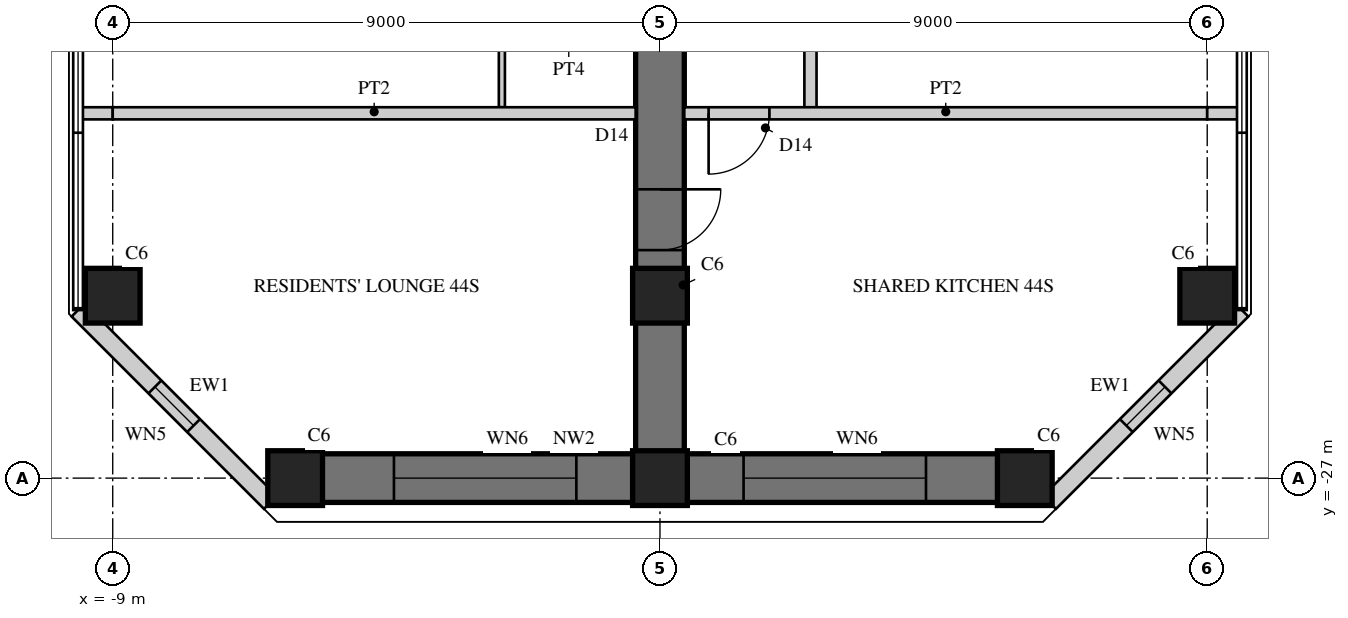
"""IFC4 building model, lengths in metres.
Left out: names, types, materials, properties, quantities, classifications, styles, units other than length and angle.
Written with IfcOpenShell. Run it as: python <this file> out.ifc"""

import sys

from ifc_helpers import new_model, si_unit, direction, frame, frame_2d, origin, origin_2d, place, context, subcontext, project, spatial, rectangle, hollow_rectangle, extrude, element, fill, save


model = new_model("IFC4")
c1 = context("Model", 3, precision=1e-05, world=origin(), true_north=direction((0.0, 1.0)))
c2 = subcontext(c1, "Body", "Model", "MODEL_VIEW")
j1 = project(units=[si_unit("LENGTHUNIT", "METRE"), si_unit("PLANEANGLEUNIT", "RADIAN")], contexts=[c1])
p1 = place(None, origin())
s1 = spatial("IfcSite", under=j1, at=p1, CompositionType="ELEMENT")
p2 = place(p1, origin())
s2 = spatial("IfcBuilding", under=s1, at=p2, CompositionType="ELEMENT")
p3 = place(p2, frame((0.0, 0.0, 179.7)))
s3 = spatial("IfcBuildingStorey", under=s2, at=p3, CompositionType="ELEMENT", Elevation=179.7)
p4 = place(p3, frame((0.0, -9.0, 0.0), z_axis=(0.0, 0.0, 1.0), x_axis=(0.0, -1.0, 0.0)))
e1 = element("IfcWall", 1, at=p4, inside=s3, PredefinedType="SHEAR", context=c2, shape_type="SweptSolid", body=[
    extrude(rectangle(XDim=18.0, YDim=0.8, at=frame_2d((9.0, 0.0))), origin(), (0.0, 0.0, 1.0), 3.4),
])
p5 = place(p4, frame((3.95, 0.0, 0.0)))
e2 = element("IfcOpeningElement", 2, at=p5, cuts=e1, PredefinedType="OPENING", context=c2, shape_type="SweptSolid", body=[
    extrude(rectangle(XDim=1.0, YDim=2.15, at=frame_2d((0.5, 1.075))), frame((0.0, 0.41, 0.0), z_axis=(0.0, -1.0, 0.0), x_axis=(1.0, 0.0, 0.0)), (0.0, 0.0, 1.0), 0.82),
])
p6 = place(p4, frame((6.6, 0.0, 0.0)))
e3 = element("IfcOpeningElement", 3, at=p6, cuts=e1, PredefinedType="OPENING", context=c2, shape_type="SweptSolid", body=[
    extrude(rectangle(XDim=1.0, YDim=2.15, at=frame_2d((0.5, 1.075))), frame((0.0, 0.41, 0.0), z_axis=(0.0, -1.0, 0.0), x_axis=(1.0, 0.0, 0.0)), (0.0, 0.0, 1.0), 0.82),
])
p7 = place(p4, frame((13.25, 0.0, 0.0)))
e4 = element("IfcOpeningElement", 4, at=p7, cuts=e1, PredefinedType="OPENING", context=c2, shape_type="SweptSolid", body=[
    extrude(rectangle(XDim=1.0, YDim=2.2, at=frame_2d((0.5, 1.1))), frame((0.0, 0.41, 0.0), z_axis=(0.0, -1.0, 0.0), x_axis=(1.0, 0.0, 0.0)), (0.0, 0.0, 1.0), 0.82),
])
p8 = place(p3, frame((-6.0, -27.0, 0.0), z_axis=(0.0, 0.0, 1.0), x_axis=(1.0, 0.0, 0.0)))
e5 = element("IfcWall", 5, at=p8, inside=s3, PredefinedType="SHEAR", context=c2, shape_type="SweptSolid", body=[
    extrude(rectangle(XDim=12.0, YDim=0.8, at=frame_2d((6.0, 0.0))), origin(), (0.0, 0.0, 1.0), 3.4),
])
p9 = place(p8, frame((1.625, 0.0, 0.6)))
e6 = element("IfcOpeningElement", 6, at=p9, cuts=e5, PredefinedType="OPENING", context=c2, shape_type="SweptSolid", body=[
    extrude(rectangle(XDim=3.0, YDim=2.4, at=frame_2d((1.5, 1.2))), frame((0.0, 0.41, 0.0), z_axis=(0.0, -1.0, 0.0), x_axis=(1.0, 0.0, 0.0)), (0.0, 0.0, 1.0), 0.82),
])
p10 = place(p8, frame((7.375, 0.0, 0.6)))
e7 = element("IfcOpeningElement", 7, at=p10, cuts=e5, PredefinedType="OPENING", context=c2, shape_type="SweptSolid", body=[
    extrude(rectangle(XDim=3.0, YDim=2.4, at=frame_2d((1.5, 1.2))), frame((0.0, 0.41, 0.0), z_axis=(0.0, -1.0, 0.0), x_axis=(1.0, 0.0, 0.0)), (0.0, 0.0, 1.0), 0.82),
])
for number, where, z_axis, x_axis in (
    (8, (-9.0, -24.0, 0.0), (0.0, 0.0, 1.0), (1.0, 0.0, 0.0)),
    (9, (9.0, -24.0, 0.0), (0.0, 0.0, 1.0), (1.0, 0.0, 0.0)),
    (10, (-6.0, -27.0, 0.0), (0.0, 0.0, 1.0), (1.0, 0.0, 0.0)),
    (11, (0.0, -27.0, 0.0), (0.0, 0.0, 1.0), (1.0, 0.0, 0.0)),
    (12, (6.0, -27.0, 0.0), (0.0, 0.0, 1.0), (1.0, 0.0, 0.0)),
    (13, (0.0, -24.0, 0.0), (0.0, 0.0, 1.0), (1.0, 0.0, 0.0)),
):
    element("IfcColumn", number, at=place(p3, frame(where, z_axis=z_axis, x_axis=x_axis)), inside=s3, PredefinedType="COLUMN", context=c2, shape_type="SweptSolid", body=[
        extrude(rectangle(XDim=0.9, YDim=0.9, at=origin_2d()), origin(), (0.0, 0.0, 1.0), 3.4),
    ])
p11 = place(p3, frame((-9.57, -24.236, 0.0), z_axis=(0.0, 0.0, 1.0), x_axis=(0.707134062067, -0.707079499254, 0.0)))
e14 = element("IfcWall", 14, at=p11, inside=s3, PredefinedType="SOLIDWALL", context=c2, shape_type="SweptSolid", body=[
    extrude(rectangle(XDim=4.475, YDim=0.3, at=frame_2d((2.237, 0.0))), origin(), (0.0, 0.0, 1.0), 3.22),
])
p12 = place(p11, frame((1.787, 0.0, 0.3)))
e15 = element("IfcOpeningElement", 15, at=p12, cuts=e14, PredefinedType="OPENING", context=c2, shape_type="SweptSolid", body=[
    extrude(rectangle(XDim=0.9, YDim=2.4, at=frame_2d((0.45, 1.2))), frame((0.0, 0.16, 0.0), z_axis=(0.0, -1.0, 0.0), x_axis=(1.0, 0.0, 0.0)), (0.0, 0.0, 1.0), 0.32),
])
p13 = place(p3, frame((6.406, -27.4, 0.0), z_axis=(0.0, 0.0, 1.0), x_axis=(0.707134062067, 0.707079499254, 0.0)))
e16 = element("IfcWall", 16, at=p13, inside=s3, PredefinedType="SOLIDWALL", context=c2, shape_type="SweptSolid", body=[
    extrude(rectangle(XDim=4.475, YDim=0.3, at=frame_2d((2.237, 0.0))), origin(), (0.0, 0.0, 1.0), 3.22),
])
p14 = place(p13, frame((1.787, 0.0, 0.3)))
e17 = element("IfcOpeningElement", 17, at=p14, cuts=e16, PredefinedType="OPENING", context=c2, shape_type="SweptSolid", body=[
    extrude(rectangle(XDim=0.9, YDim=2.4, at=frame_2d((0.45, 1.2))), frame((0.0, 0.16, 0.0), z_axis=(0.0, -1.0, 0.0), x_axis=(1.0, 0.0, 0.0)), (0.0, 0.0, 1.0), 0.32),
])
p15 = place(p3, frame((-2.6, -18.45, 0.0), z_axis=(0.0, 0.0, 1.0), x_axis=(0.0, -1.0, 0.0)))
e18 = element("IfcWall", 18, at=p15, inside=s3, PredefinedType="PARTITIONING", context=c2, shape_type="SweptSolid", body=[
    extrude(rectangle(XDim=2.45, YDim=0.1, at=frame_2d((1.225, 0.0))), origin(), (0.0, 0.0, 1.0), 3.22),
])
p16 = place(p3, frame((2.475, -9.55, 0.0), z_axis=(0.0, 0.0, 1.0), x_axis=(0.0, -1.0, 0.0)))
e19 = element("IfcWall", 19, at=p16, inside=s3, PredefinedType="SOLIDWALL", context=c2, shape_type="SweptSolid", body=[
    extrude(rectangle(XDim=11.45, YDim=0.2, at=frame_2d((5.725, 0.0))), origin(), (0.0, 0.0, 1.0), 3.22),
])
p17 = place(p16, frame((3.4, 0.0, 0.0)))
e20 = element("IfcOpeningElement", 20, at=p17, cuts=e19, PredefinedType="OPENING", context=c2, shape_type="SweptSolid", body=[
    extrude(rectangle(XDim=1.0, YDim=2.15, at=frame_2d((0.5, 1.075))), frame((0.0, 0.11, 0.0), z_axis=(0.0, -1.0, 0.0), x_axis=(1.0, 0.0, 0.0)), (0.0, 0.0, 1.0), 0.22),
])
p18 = place(p3, frame((-9.53, -21.0, 0.0), z_axis=(0.0, 0.0, 1.0), x_axis=(1.0, 0.0, 0.0)))
e21 = element("IfcWall", 21, at=p18, inside=s3, PredefinedType="SOLIDWALL", context=c2, shape_type="SweptSolid", body=[
    extrude(rectangle(XDim=0.53, YDim=0.2, at=frame_2d((0.265, 0.0))), origin(), (0.0, 0.0, 1.0), 3.22),
])
p19 = place(p3, frame((-9.0, -21.0, 0.0), z_axis=(0.0, 0.0, 1.0), x_axis=(1.0, 0.0, 0.0)))
e22 = element("IfcWall", 22, at=p19, inside=s3, PredefinedType="SOLIDWALL", context=c2, shape_type="SweptSolid", body=[
    extrude(rectangle(XDim=8.6, YDim=0.2, at=frame_2d((4.3, 0.0))), origin(), (0.0, 0.0, 1.0), 2.62),
])
p20 = place(p3, frame((0.4, -21.0, 0.0), z_axis=(0.0, 0.0, 1.0), x_axis=(1.0, 0.0, 0.0)))
e23 = element("IfcWall", 23, at=p20, inside=s3, PredefinedType="SOLIDWALL", context=c2, shape_type="SweptSolid", body=[
    extrude(rectangle(XDim=8.6, YDim=0.2, at=frame_2d((4.3, 0.0))), origin(), (0.0, 0.0, 1.0), 2.62),
])
p21 = place(p20, frame((0.4, 0.0, 0.0)))
e24 = element("IfcOpeningElement", 24, at=p21, cuts=e23, PredefinedType="OPENING", context=c2, shape_type="SweptSolid", body=[
    extrude(rectangle(XDim=1.0, YDim=2.2, at=frame_2d((0.5, 1.1))), frame((0.0, 0.11, 0.0), z_axis=(0.0, -1.0, 0.0), x_axis=(1.0, 0.0, 0.0)), (0.0, 0.0, 1.0), 0.22),
])
p22 = place(p3, frame((9.0, -21.0, 0.0), z_axis=(0.0, 0.0, 1.0), x_axis=(1.0, 0.0, 0.0)))
e25 = element("IfcWall", 25, at=p22, inside=s3, PredefinedType="SOLIDWALL", context=c2, shape_type="SweptSolid", body=[
    extrude(rectangle(XDim=0.53, YDim=0.2, at=frame_2d((0.265, 0.0))), origin(), (0.0, 0.0, 1.0), 3.22),
])
p23 = place(p12, origin())
e26 = element("IfcWindow", 26, at=p23, inside=s3, PartitioningType="SINGLE_PANEL", PredefinedType="WINDOW", context=c2, shape_type="SweptSolid", body=[
    extrude(hollow_rectangle(XDim=0.9, YDim=2.4, WallThickness=0.06, at=frame_2d((0.45, 1.2))), frame((0.0, 0.03, 0.0), z_axis=(0.0, -1.0, 0.0), x_axis=(1.0, 0.0, 0.0)), (0.0, 0.0, 1.0), 0.06),
    extrude(rectangle(XDim=0.779, YDim=2.279, at=frame_2d((0.45, 1.2))), frame((0.0, 0.03, 0.0), z_axis=(0.0, -1.0, 0.0), x_axis=(1.0, 0.0, 0.0)), (0.0, 0.0, 1.0), 0.06),
])
fill(e15, e26)
p24 = place(p9, origin())
e27 = element("IfcWindow", 27, at=p24, inside=s3, PartitioningType="SINGLE_PANEL", PredefinedType="WINDOW", context=c2, shape_type="SweptSolid", body=[
    extrude(hollow_rectangle(XDim=3.0, YDim=2.4, WallThickness=0.06, at=frame_2d((1.5, 1.2))), frame((0.0, 0.03, 0.0), z_axis=(0.0, -1.0, 0.0), x_axis=(1.0, 0.0, 0.0)), (0.0, 0.0, 1.0), 0.06),
    extrude(rectangle(XDim=2.879, YDim=2.279, at=frame_2d((1.5, 1.2))), frame((0.0, 0.03, 0.0), z_axis=(0.0, -1.0, 0.0), x_axis=(1.0, 0.0, 0.0)), (0.0, 0.0, 1.0), 0.06),
])
fill(e6, e27)
p25 = place(p10, origin())
e28 = element("IfcWindow", 28, at=p25, inside=s3, PartitioningType="SINGLE_PANEL", PredefinedType="WINDOW", context=c2, shape_type="SweptSolid", body=[
    extrude(hollow_rectangle(XDim=3.0, YDim=2.4, WallThickness=0.06, at=frame_2d((1.5, 1.2))), frame((0.0, 0.03, 0.0), z_axis=(0.0, -1.0, 0.0), x_axis=(1.0, 0.0, 0.0)), (0.0, 0.0, 1.0), 0.06),
    extrude(rectangle(XDim=2.879, YDim=2.279, at=frame_2d((1.5, 1.2))), frame((0.0, 0.03, 0.0), z_axis=(0.0, -1.0, 0.0), x_axis=(1.0, 0.0, 0.0)), (0.0, 0.0, 1.0), 0.06),
])
fill(e7, e28)
p26 = place(p14, origin())
e29 = element("IfcWindow", 29, at=p26, inside=s3, PartitioningType="SINGLE_PANEL", PredefinedType="WINDOW", context=c2, shape_type="SweptSolid", body=[
    extrude(hollow_rectangle(XDim=0.9, YDim=2.4, WallThickness=0.06, at=frame_2d((0.45, 1.2))), frame((0.0, 0.03, 0.0), z_axis=(0.0, -1.0, 0.0), x_axis=(1.0, 0.0, 0.0)), (0.0, 0.0, 1.0), 0.06),
    extrude(rectangle(XDim=0.779, YDim=2.279, at=frame_2d((0.45, 1.2))), frame((0.0, 0.03, 0.0), z_axis=(0.0, -1.0, 0.0), x_axis=(1.0, 0.0, 0.0)), (0.0, 0.0, 1.0), 0.06),
])
fill(e17, e29)
p27 = place(p21, frame((1.0, 0.0, 0.0), z_axis=(0.0, 0.0, 1.0), x_axis=(-1.0, 0.0, 0.0)))
e30 = element("IfcDoor", 30, at=p27, inside=s3, OperationType="SINGLE_SWING_RIGHT", PredefinedType="DOOR", context=c2, shape_type="SweptSolid", body=[
    extrude(rectangle(XDim=1.0, YDim=2.2, at=frame_2d((0.5, 1.1))), frame((0.0, 0.025, 0.0), z_axis=(0.0, -1.0, 0.0), x_axis=(1.0, 0.0, 0.0)), (0.0, 0.0, 1.0), 0.05),
])
fill(e24, e30)
p28 = place(p7, origin())
e31 = element("IfcDoor", 31, at=p28, inside=s3, OperationType="SINGLE_SWING_LEFT", PredefinedType="DOOR", context=c2, shape_type="SweptSolid", body=[
    extrude(rectangle(XDim=1.0, YDim=2.2, at=frame_2d((0.5, 1.1))), frame((0.0, 0.025, 0.0), z_axis=(0.0, -1.0, 0.0), x_axis=(1.0, 0.0, 0.0)), (0.0, 0.0, 1.0), 0.05),
])
fill(e4, e31)
save(model, sys.argv[1])
